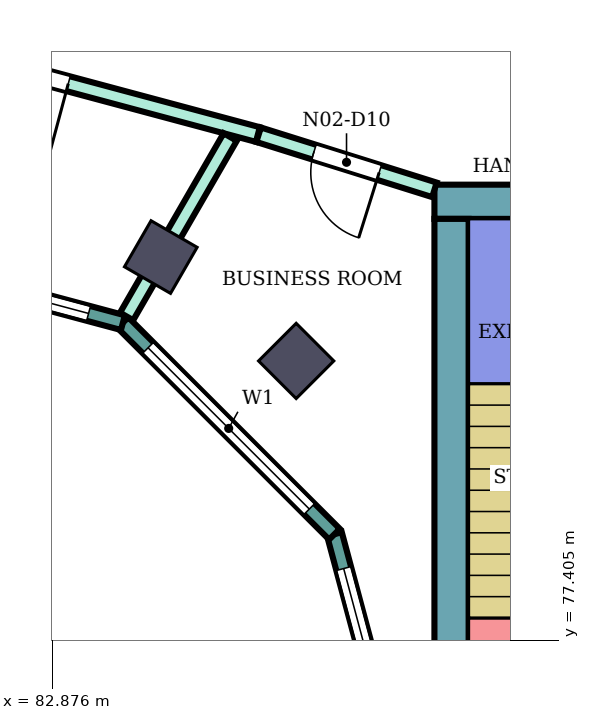
"""IFC4 building model, lengths in metres.
Left out: names, types, materials, properties, quantities, classifications, styles, units other than length and angle.
Written with IfcOpenShell. Run it as: python <this file> out.ifc"""

import sys

from ifc_helpers import new_model, si_unit, direction, frame, frame_2d, origin, origin_2d, place, context, subcontext, project, spatial, rectangle, extrude, element, fill, save


model = new_model("IFC4")
c1 = context("Model", 3, precision=1e-05, world=origin(), true_north=direction((0.0, 1.0)))
c2 = subcontext(c1, "Body", "Model", "MODEL_VIEW")
j1 = project(units=[si_unit("LENGTHUNIT", "METRE"), si_unit("PLANEANGLEUNIT", "RADIAN")], contexts=[c1])
p1 = place(None, origin())
s1 = spatial("IfcSite", under=j1, at=p1, CompositionType="ELEMENT")
p2 = place(p1, origin())
s2 = spatial("IfcBuilding", under=s1, at=p2, CompositionType="ELEMENT")
p3 = place(p2, frame((0.0, 0.0, 288.3)))
s3 = spatial("IfcBuildingStorey", under=s2, at=p3, CompositionType="ELEMENT", Elevation=288.3)
for number, where, z_axis, x_axis in (
    (1, (86.081, 81.081, 0.0), (0.0, 0.0, 1.0), (0.707, 0.707, 0.0)),
    (2, (84.3, 82.448, 0.0), (0.0, 0.0, 1.0), (0.5, 0.866, 0.0)),
):
    element("IfcColumn", number, at=place(p3, frame(where, z_axis=z_axis, x_axis=x_axis)), inside=s3, PredefinedType="COLUMN", context=c2, shape_type="SweptSolid", body=[
        extrude(rectangle(XDim=0.7, YDim=0.7, at=origin_2d()), origin(), (0.0, 0.0, 1.0), 4.2),
    ])
p4 = place(p3, frame((87.9, 83.175, 0.0), z_axis=(0.0, 0.0, 1.0), x_axis=(1.0, 0.0, 0.0)))
e3 = element("IfcWall", 3, at=p4, inside=s3, PredefinedType="SHEAR", context=c2, shape_type="SweptSolid", body=[
    extrude(rectangle(XDim=13.55, YDim=0.45, at=frame_2d((6.775, 0.0))), origin(), (0.0, 0.0, 1.0), 3.88),
])
p5 = place(p4, frame((4.2, 0.0, 0.0)))
e4 = element("IfcOpeningElement", 4, at=p5, cuts=e3, PredefinedType="OPENING", context=c2, shape_type="SweptSolid", body=[
    extrude(rectangle(XDim=2.4, YDim=2.4, at=frame_2d((1.2, 1.2))), frame((0.0, 0.235, 0.0), z_axis=(0.0, -1.0, 0.0), x_axis=(1.0, 0.0, 0.0)), (0.0, 0.0, 1.0), 0.47),
])
p6 = place(p3, frame((88.125, 75.0, 0.0), z_axis=(0.0, 0.0, 1.0), x_axis=(0.0, 1.0, 0.0)))
e5 = element("IfcWall", 5, at=p6, inside=s3, PredefinedType="SHEAR", context=c2, shape_type="SweptSolid", body=[
    extrude(rectangle(XDim=7.95, YDim=0.45, at=frame_2d((3.975, 0.0))), origin(), (0.0, 0.0, 1.0), 3.88),
])
p7 = place(p3, frame((87.604, 75.0, 0.0), z_axis=(0.0, 0.0, 1.0), x_axis=(-0.258789828301, 0.965933654434, 0.0)))
e6 = element("IfcWall", 6, at=p7, inside=s3, PredefinedType="NOTDEFINED", context=c2, shape_type="SweptSolid", body=[
    extrude(rectangle(XDim=3.936, YDim=0.2, at=frame_2d((1.968, 0.0))), origin(), (0.0, 0.0, 1.0), 4.2),
])
p8 = place(p7, frame((0.468, 0.0, 0.9)))
e7 = element("IfcOpeningElement", 7, at=p8, cuts=e6, PredefinedType="OPENING", context=c2, shape_type="SweptSolid", body=[
    extrude(rectangle(XDim=3.0, YDim=2.3, at=frame_2d((1.5, 1.15))), frame((0.0, 0.11, 0.0), z_axis=(0.0, -1.0, 0.0), x_axis=(1.0, 0.0, 0.0)), (0.0, 0.0, 1.0), 0.22),
])
p9 = place(p3, frame((86.585, 78.802, 0.0), z_axis=(0.0, 0.0, 1.0), x_axis=(-0.707106781187, 0.707106781187, 0.0)))
e8 = element("IfcWall", 8, at=p9, inside=s3, PredefinedType="NOTDEFINED", context=c2, shape_type="SweptSolid", body=[
    extrude(rectangle(XDim=3.936, YDim=0.2, at=frame_2d((1.968, 0.0))), origin(), (0.0, 0.0, 1.0), 4.2),
])
p10 = place(p9, frame((0.468, 0.0, 0.9)))
e9 = element("IfcOpeningElement", 9, at=p10, cuts=e8, PredefinedType="OPENING", context=c2, shape_type="SweptSolid", body=[
    extrude(rectangle(XDim=3.0, YDim=2.3, at=frame_2d((1.5, 1.15))), frame((0.0, 0.11, 0.0), z_axis=(0.0, -1.0, 0.0), x_axis=(1.0, 0.0, 0.0)), (0.0, 0.0, 1.0), 0.22),
])
p11 = place(p3, frame((83.802, 81.585, 0.0), z_axis=(0.0, 0.0, 1.0), x_axis=(-0.965933654434, 0.258789828301, 0.0)))
e10 = element("IfcWall", 10, at=p11, inside=s3, PredefinedType="NOTDEFINED", context=c2, shape_type="SweptSolid", body=[
    extrude(rectangle(XDim=3.936, YDim=0.2, at=frame_2d((1.968, 0.0))), origin(), (0.0, 0.0, 1.0), 4.2),
])
p12 = place(p11, frame((0.468, 0.0, 0.9)))
e11 = element("IfcOpeningElement", 11, at=p12, cuts=e10, PredefinedType="OPENING", context=c2, shape_type="SweptSolid", body=[
    extrude(rectangle(XDim=3.0, YDim=2.3, at=frame_2d((1.5, 1.15))), frame((0.0, 0.11, 0.0), z_axis=(0.0, -1.0, 0.0), x_axis=(1.0, 0.0, 0.0)), (0.0, 0.0, 1.0), 0.22),
])
p13 = place(p3, frame((80.0, 85.554, 0.0), z_axis=(0.0, 0.0, 1.0), x_axis=(0.965928989968, -0.258807237802, 0.0)))
e12 = element("IfcWall", 12, at=p13, inside=s3, PredefinedType="PARTITIONING", context=c2, shape_type="SweptSolid", body=[
    extrude(rectangle(XDim=5.774, YDim=0.2, at=frame_2d((2.887, 0.0))), origin(), (0.0, 0.0, 1.0), 3.75),
])
p14 = place(p13, frame((2.292, 0.0, 0.0)))
e13 = element("IfcOpeningElement", 13, at=p14, cuts=e12, PredefinedType="OPENING", context=c2, shape_type="SweptSolid", body=[
    extrude(rectangle(XDim=0.9, YDim=2.1, at=frame_2d((0.45, 1.05))), frame((0.0, 0.11, 0.0), z_axis=(0.0, -1.0, 0.0), x_axis=(1.0, 0.0, 0.0)), (0.0, 0.0, 1.0), 0.22),
])
p15 = place(p3, frame((83.85, 81.667, 0.0), z_axis=(0.0, 0.0, 1.0), x_axis=(0.500185068774, 0.865918527909, 0.0)))
e14 = element("IfcWall", 14, at=p15, inside=s3, PredefinedType="PARTITIONING", context=c2, shape_type="SweptSolid", body=[
    extrude(rectangle(XDim=2.726, YDim=0.2, at=frame_2d((1.363, 0.0))), origin(), (0.0, 0.0, 1.0), 3.75),
])
p16 = place(p3, frame((85.587, 84.057, 0.0), z_axis=(0.0, 0.0, 1.0), x_axis=(0.954239513179, -0.299043393987, 0.0)))
e15 = element("IfcWall", 15, at=p16, inside=s3, PredefinedType="PARTITIONING", context=c2, shape_type="SweptSolid", body=[
    extrude(rectangle(XDim=2.424, YDim=0.2, at=frame_2d((1.212, 0.0))), origin(), (0.0, 0.0, 1.0), 3.75),
])
p17 = place(p16, frame((0.762, 0.0, 0.0)))
e16 = element("IfcOpeningElement", 16, at=p17, cuts=e15, PredefinedType="OPENING", context=c2, shape_type="SweptSolid", body=[
    extrude(rectangle(XDim=0.9, YDim=2.1, at=frame_2d((0.45, 1.05))), frame((0.0, 0.11, 0.0), z_axis=(0.0, -1.0, 0.0), x_axis=(1.0, 0.0, 0.0)), (0.0, 0.0, 1.0), 0.22),
])
p18 = place(p3, frame((86.313, 86.555, 0.0), z_axis=(0.0, 0.0, 1.0), x_axis=(0.9540216201, -0.299737799389, 0.0)))
e17 = element("IfcWall", 17, at=p18, inside=s3, PredefinedType="PARTITIONING", context=c2, shape_type="SweptSolid", body=[
    extrude(rectangle(XDim=5.719, YDim=0.2, at=frame_2d((2.86, 0.0))), origin(), (0.0, 0.0, 1.0), 3.75),
])
p19 = place(p8, origin())
e18 = element("IfcWindow", 18, at=p19, inside=s3, PartitioningType="SINGLE_PANEL", PredefinedType="WINDOW", context=c2, shape_type="SweptSolid", body=[
    extrude(rectangle(XDim=3.0, YDim=2.3, at=frame_2d((1.5, 1.15))), frame((0.0, 0.03, 0.0), z_axis=(0.0, -1.0, 0.0), x_axis=(1.0, 0.0, 0.0)), (0.0, 0.0, 1.0), 0.06),
])
fill(e7, e18)
p20 = place(p10, origin())
e19 = element("IfcWindow", 19, at=p20, inside=s3, PartitioningType="SINGLE_PANEL", PredefinedType="WINDOW", context=c2, shape_type="SweptSolid", body=[
    extrude(rectangle(XDim=3.0, YDim=2.3, at=frame_2d((1.5, 1.15))), frame((0.0, 0.03, 0.0), z_axis=(0.0, -1.0, 0.0), x_axis=(1.0, 0.0, 0.0)), (0.0, 0.0, 1.0), 0.06),
])
fill(e9, e19)
p21 = place(p12, origin())
e20 = element("IfcWindow", 20, at=p21, inside=s3, PartitioningType="SINGLE_PANEL", PredefinedType="WINDOW", context=c2, shape_type="SweptSolid", body=[
    extrude(rectangle(XDim=3.0, YDim=2.3, at=frame_2d((1.5, 1.15))), frame((0.0, 0.03, 0.0), z_axis=(0.0, -1.0, 0.0), x_axis=(1.0, 0.0, 0.0)), (0.0, 0.0, 1.0), 0.06),
])
fill(e11, e20)
p22 = place(p17, frame((0.9, 0.0, 0.0), z_axis=(0.0, 0.0, 1.0), x_axis=(-1.0, 0.0, 0.0)))
e21 = element("IfcDoor", 21, at=p22, inside=s3, OperationType="SINGLE_SWING_LEFT", PredefinedType="DOOR", context=c2, shape_type="SweptSolid", body=[
    extrude(rectangle(XDim=0.9, YDim=2.1, at=frame_2d((0.45, 1.05))), frame((0.0, 0.025, 0.0), z_axis=(0.0, -1.0, 0.0), x_axis=(1.0, 0.0, 0.0)), (0.0, 0.0, 1.0), 0.05),
])
fill(e16, e21)
p23 = place(p14, frame((0.9, 0.0, 0.0), z_axis=(0.0, 0.0, 1.0), x_axis=(-1.0, 0.0, 0.0)))
e22 = element("IfcDoor", 22, at=p23, inside=s3, OperationType="SINGLE_SWING_LEFT", PredefinedType="DOOR", context=c2, shape_type="SweptSolid", body=[
    extrude(rectangle(XDim=0.9, YDim=2.1, at=frame_2d((0.45, 1.05))), frame((0.0, 0.025, 0.0), z_axis=(0.0, -1.0, 0.0), x_axis=(1.0, 0.0, 0.0)), (0.0, 0.0, 1.0), 0.05),
])
fill(e13, e22)
save(model, sys.argv[1])
